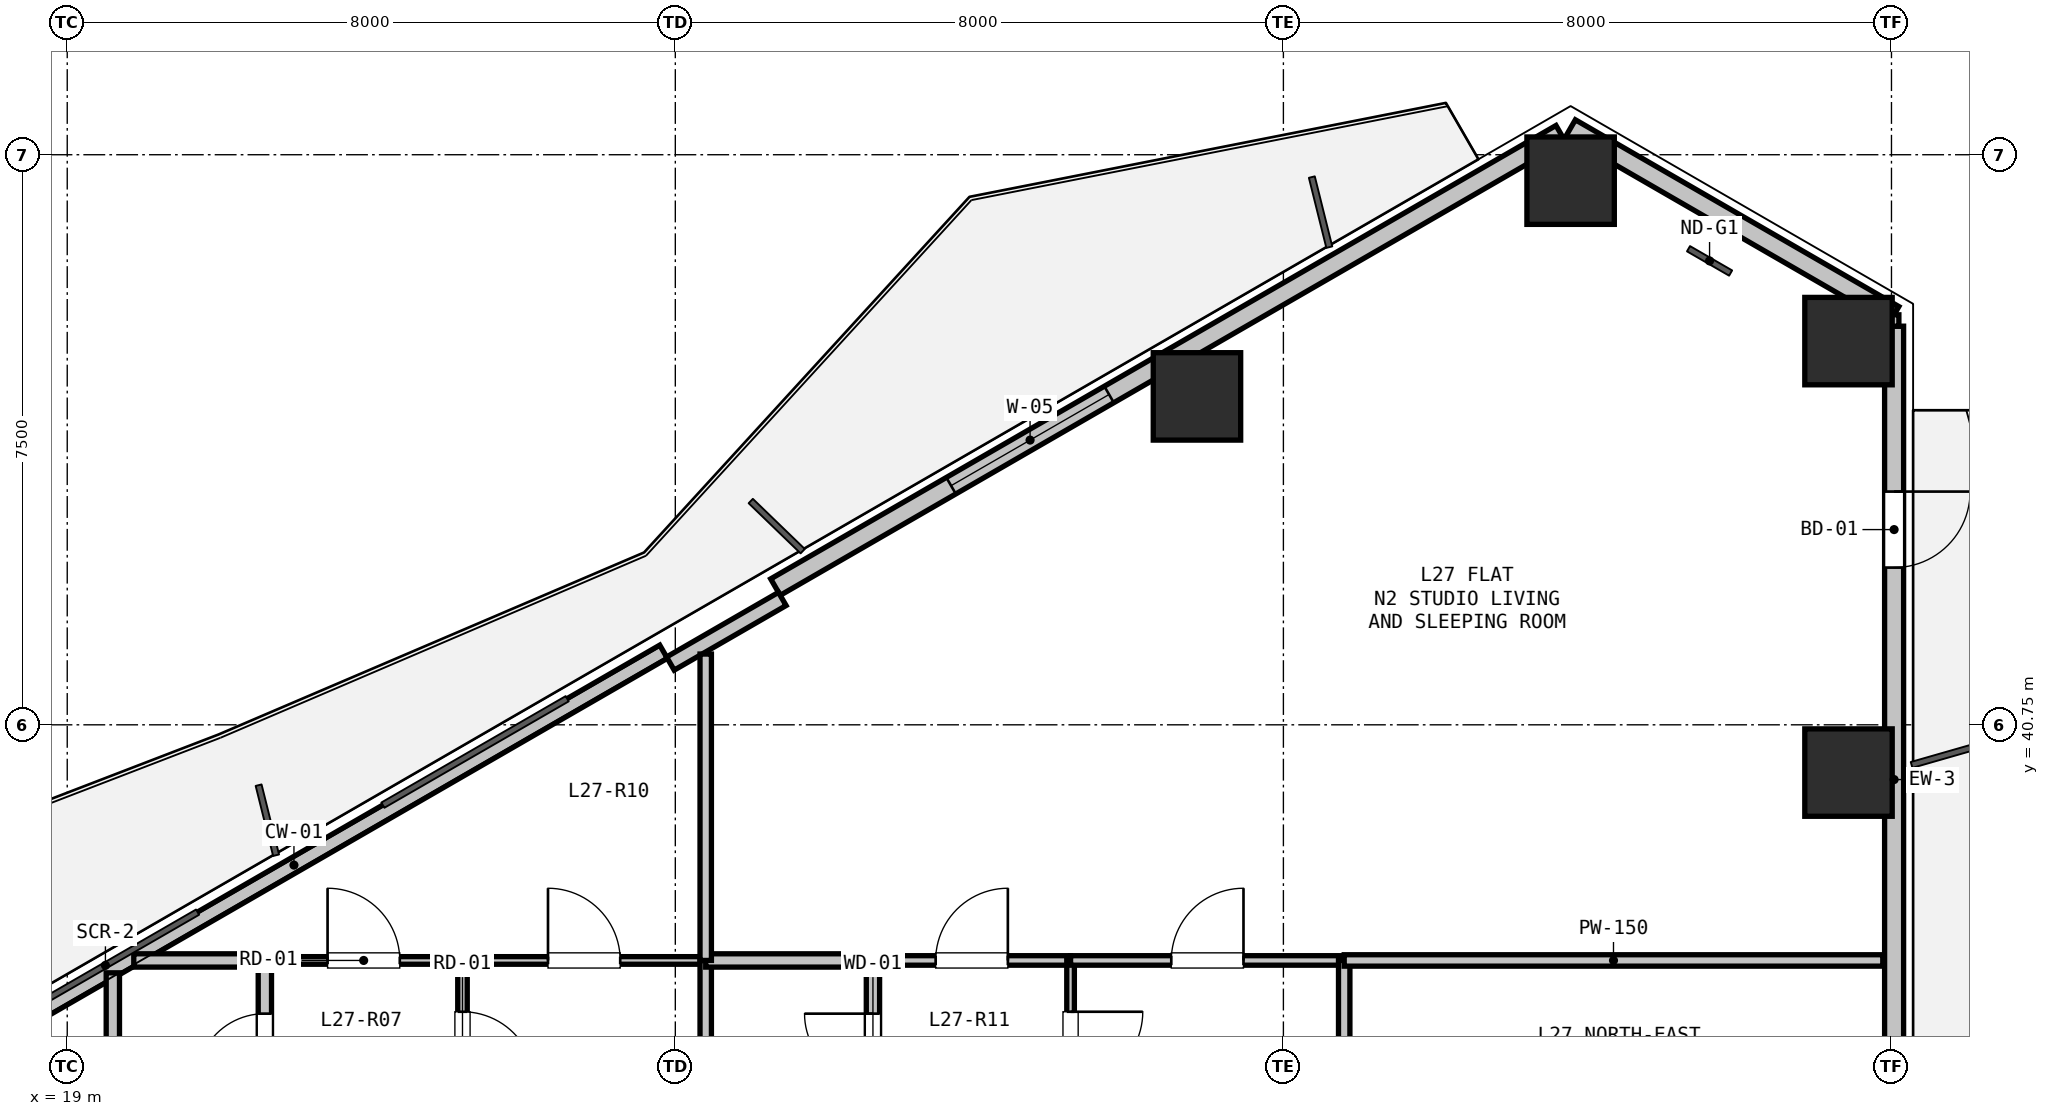
"""IFC4 building model, lengths in metres.
Left out: names, types, materials, properties, quantities, classifications, styles, units other than length and angle.
Written with IfcOpenShell. Run it as: python <this file> out.ifc"""

import sys

from ifc_helpers import new_model, si_unit, direction, frame, frame_2d, origin, origin_2d, place, context, subcontext, project, spatial, rectangle, hollow_rectangle, extrude, element, fill, save


model = new_model("IFC4")
c1 = context("Model", 3, precision=1e-05, world=origin(), true_north=direction((0.0, 1.0)))
c2 = subcontext(c1, "Body", "Model", "MODEL_VIEW")
j1 = project(units=[si_unit("LENGTHUNIT", "METRE"), si_unit("PLANEANGLEUNIT", "RADIAN")], contexts=[c1])
p1 = place(None, origin())
s1 = spatial("IfcSite", under=j1, at=p1, CompositionType="ELEMENT")
p2 = place(p1, origin())
s2 = spatial("IfcBuilding", under=s1, at=p2, CompositionType="ELEMENT")
p3 = place(p2, frame((0.0, 0.0, 99.9)))
s3 = spatial("IfcBuildingStorey", under=s2, at=p3, CompositionType="ELEMENT", Elevation=99.9)
for number, where, z_axis, x_axis in (
    (1, (33.863, 45.071, 0.0), (0.0, 0.0, 1.0), (1.0, 0.0, 0.0)),
    (2, (38.779, 47.909, 0.0), (0.0, 0.0, 1.0), (1.0, 0.0, 0.0)),
    (3, (42.435, 45.798, 0.0), (0.0, 0.0, 1.0), (1.0, 0.0, 0.0)),
    (4, (42.435, 40.122, 0.0), (0.0, 0.0, 1.0), (1.0, 0.0, 0.0)),
):
    element("IfcColumn", number, at=place(p3, frame(where, z_axis=z_axis, x_axis=x_axis)), inside=s3, PredefinedType="COLUMN", context=c2, shape_type="SweptSolid", body=[
        extrude(hollow_rectangle(XDim=1.15, YDim=1.15, WallThickness=0.032, at=origin_2d()), origin(), (0.0, 0.0, 1.0), 3.3),
    ])
p4 = place(p3, frame((38.779, 48.602, 0.0), z_axis=(0.0, 0.0, 1.0), x_axis=(0.866011848704, -0.500023477353, 0.0)))
e5 = element("IfcWall", 5, at=p4, inside=s3, PredefinedType="SOLIDWALL", context=c2, shape_type="SweptSolid", body=[
    extrude(rectangle(XDim=4.914, YDim=0.25, at=frame_2d((2.457, 0.0))), origin(), (0.0, 0.0, 1.0), 2.67),
])
p5 = place(p3, frame((17.12, 36.097, 0.0), z_axis=(0.0, 0.0, 1.0), x_axis=(0.866027010039, 0.499997217876, 0.0)))
e6 = element("IfcWall", 6, at=p5, inside=s3, PredefinedType="PARAPET", context=c2, shape_type="SweptSolid", body=[
    extrude(rectangle(XDim=11.229, YDim=0.2, at=frame_2d((5.615, 0.0))), origin(), (0.0, 0.0, 1.0), 0.2),
])
p6 = place(p3, frame((28.317, 42.562, 0.0), z_axis=(0.0, 0.0, 1.0), x_axis=(0.866023023012, 0.500004123596, 0.0)))
e7 = element("IfcWall", 7, at=p6, inside=s3, PredefinedType="SOLIDWALL", context=c2, shape_type="SweptSolid", body=[
    extrude(rectangle(XDim=11.93, YDim=0.25, at=frame_2d((5.965, 0.0))), origin(), (0.0, 0.0, 1.0), 2.67),
])
p7 = place(p6, frame((2.668, 0.0, 0.9)))
e8 = element("IfcOpeningElement", 8, at=p7, cuts=e7, PredefinedType="OPENING", context=c2, shape_type="SweptSolid", body=[
    extrude(rectangle(XDim=2.4, YDim=1.6, at=frame_2d((1.2, 0.8))), frame((0.0, 0.135, 0.0), z_axis=(0.0, -1.0, 0.0), x_axis=(1.0, 0.0, 0.0)), (0.0, 0.0, 1.0), 0.27),
])
p8 = place(p3, frame((26.935, 41.556, 0.0), z_axis=(0.0, 0.0, 1.0), x_axis=(0.86605165483, 0.499954529098, 0.0)))
e9 = element("IfcWall", 9, at=p8, inside=s3, PredefinedType="PARAPET", context=c2, shape_type="SweptSolid", body=[
    extrude(rectangle(XDim=1.7, YDim=0.2, at=frame_2d((0.85, 0.0))), origin(), (0.0, 0.0, 1.0), 2.67),
])
p9 = place(p3, frame((43.035, 45.994, 0.0), z_axis=(0.0, 0.0, 1.0), x_axis=(0.0, -1.0, 0.0)))
e10 = element("IfcWall", 10, at=p9, inside=s3, PredefinedType="SOLIDWALL", context=c2, shape_type="SweptSolid", body=[
    extrude(rectangle(XDim=11.93, YDim=0.25, at=frame_2d((5.965, 0.0))), origin(), (0.0, 0.0, 1.0), 2.67),
])
p10 = place(p9, frame((2.176, 0.0, 0.0)))
e11 = element("IfcOpeningElement", 11, at=p10, cuts=e10, PredefinedType="OPENING", context=c2, shape_type="SweptSolid", body=[
    extrude(rectangle(XDim=1.0, YDim=2.1, at=frame_2d((0.5, 1.05))), frame((0.0, 0.135, 0.0), z_axis=(0.0, -1.0, 0.0), x_axis=(1.0, 0.0, 0.0)), (0.0, 0.0, 1.0), 0.27),
])
p11 = place(p3, frame((21.6, 37.65, 0.0), z_axis=(0.0, 0.0, 1.0), x_axis=(1.0, 0.0, 0.0)))
e12 = element("IfcWall", 12, at=p11, inside=s3, PredefinedType="PARTITIONING", context=c2, shape_type="SweptSolid", body=[
    extrude(rectangle(XDim=2.6, YDim=0.1, at=frame_2d((1.3, 0.0))), origin(), (0.0, 0.0, 1.0), 3.05),
])
p12 = place(p11, frame((0.825, 0.0, 0.0)))
e13 = element("IfcOpeningElement", 13, at=p12, cuts=e12, PredefinedType="OPENING", context=c2, shape_type="SweptSolid", body=[
    extrude(rectangle(XDim=0.95, YDim=2.1, at=frame_2d((0.475, 1.05))), frame((0.0, 0.06, 0.0), z_axis=(0.0, -1.0, 0.0), x_axis=(1.0, 0.0, 0.0)), (0.0, 0.0, 1.0), 0.12),
])
p13 = place(p3, frame((24.2, 37.65, 0.0), z_axis=(0.0, 0.0, 1.0), x_axis=(0.0, -1.0, 0.0)))
e14 = element("IfcWall", 14, at=p13, inside=s3, PredefinedType="PARTITIONING", context=c2, shape_type="SweptSolid", body=[
    extrude(rectangle(XDim=2.3, YDim=0.125, at=frame_2d((1.15, 0.0))), origin(), (0.0, 0.0, 1.0), 3.05),
])
p14 = place(p13, frame((0.675, 0.0, 0.0)))
e15 = element("IfcOpeningElement", 15, at=p14, cuts=e14, PredefinedType="OPENING", context=c2, shape_type="SweptSolid", body=[
    extrude(rectangle(XDim=0.95, YDim=2.1, at=frame_2d((0.475, 1.05))), frame((0.0, 0.073, 0.0), z_axis=(0.0, -1.0, 0.0), x_axis=(1.0, 0.0, 0.0)), (0.0, 0.0, 1.0), 0.145),
])
p15 = place(p3, frame((21.6, 35.35, 0.0), z_axis=(0.0, 0.0, 1.0), x_axis=(0.0, 1.0, 0.0)))
e16 = element("IfcWall", 16, at=p15, inside=s3, PredefinedType="PLUMBINGWALL", context=c2, shape_type="SweptSolid", body=[
    extrude(rectangle(XDim=2.3, YDim=0.175, at=frame_2d((1.15, 0.0))), origin(), (0.0, 0.0, 1.0), 3.05),
])
p16 = place(p15, frame((0.7, 0.0, 0.0)))
e17 = element("IfcOpeningElement", 17, at=p16, cuts=e16, PredefinedType="OPENING", context=c2, shape_type="SweptSolid", body=[
    extrude(rectangle(XDim=0.9, YDim=2.1, at=frame_2d((0.45, 1.05))), frame((0.0, 0.097, 0.0), z_axis=(0.0, -1.0, 0.0), x_axis=(1.0, 0.0, 0.0)), (0.0, 0.0, 1.0), 0.195),
])
p17 = place(p3, frame((29.6, 37.65, 0.0), z_axis=(0.0, 0.0, 1.0), x_axis=(1.0, 0.0, 0.0)))
e18 = element("IfcWall", 18, at=p17, inside=s3, PredefinedType="PARTITIONING", context=c2, shape_type="SweptSolid", body=[
    extrude(rectangle(XDim=2.6, YDim=0.125, at=frame_2d((1.3, 0.0))), origin(), (0.0, 0.0, 1.0), 3.05),
])
p18 = place(p17, frame((0.825, 0.0, 0.0)))
e19 = element("IfcOpeningElement", 19, at=p18, cuts=e18, PredefinedType="OPENING", context=c2, shape_type="SweptSolid", body=[
    extrude(rectangle(XDim=0.95, YDim=2.1, at=frame_2d((0.475, 1.05))), frame((0.0, 0.073, 0.0), z_axis=(0.0, -1.0, 0.0), x_axis=(1.0, 0.0, 0.0)), (0.0, 0.0, 1.0), 0.145),
])
p19 = place(p3, frame((32.2, 37.65, 0.0), z_axis=(0.0, 0.0, 1.0), x_axis=(0.0, -1.0, 0.0)))
e20 = element("IfcWall", 20, at=p19, inside=s3, PredefinedType="PARTITIONING", context=c2, shape_type="SweptSolid", body=[
    extrude(rectangle(XDim=2.3, YDim=0.1, at=frame_2d((1.15, 0.0))), origin(), (0.0, 0.0, 1.0), 3.05),
])
p20 = place(p19, frame((0.675, 0.0, 0.0)))
e21 = element("IfcOpeningElement", 21, at=p20, cuts=e20, PredefinedType="OPENING", context=c2, shape_type="SweptSolid", body=[
    extrude(rectangle(XDim=0.95, YDim=2.1, at=frame_2d((0.475, 1.05))), frame((0.0, 0.06, 0.0), z_axis=(0.0, -1.0, 0.0), x_axis=(1.0, 0.0, 0.0)), (0.0, 0.0, 1.0), 0.12),
])
p21 = place(p3, frame((29.6, 35.35, 0.0), z_axis=(0.0, 0.0, 1.0), x_axis=(0.0, 1.0, 0.0)))
e22 = element("IfcWall", 22, at=p21, inside=s3, PredefinedType="PLUMBINGWALL", context=c2, shape_type="SweptSolid", body=[
    extrude(rectangle(XDim=2.3, YDim=0.175, at=frame_2d((1.15, 0.0))), origin(), (0.0, 0.0, 1.0), 3.05),
])
p22 = place(p21, frame((0.7, 0.0, 0.0)))
e23 = element("IfcOpeningElement", 23, at=p22, cuts=e22, PredefinedType="OPENING", context=c2, shape_type="SweptSolid", body=[
    extrude(rectangle(XDim=0.9, YDim=2.1, at=frame_2d((0.45, 1.05))), frame((0.0, 0.097, 0.0), z_axis=(0.0, -1.0, 0.0), x_axis=(1.0, 0.0, 0.0)), (0.0, 0.0, 1.0), 0.195),
])
p23 = place(p3, frame((19.6, 35.35, 0.0), z_axis=(0.0, 0.0, 1.0), x_axis=(0.0, 1.0, 0.0)))
e24 = element("IfcWall", 24, at=p23, inside=s3, PredefinedType="PLUMBINGWALL", context=c2, shape_type="SweptSolid", body=[
    extrude(rectangle(XDim=2.137, YDim=0.175, at=frame_2d((1.068, 0.0))), origin(), (0.0, 0.0, 1.0), 2.365),
])
p24 = place(p3, frame((19.875, 37.65, 0.0), z_axis=(0.0, 0.0, 1.0), x_axis=(1.0, 0.0, 0.0)))
e25 = element("IfcWall", 25, at=p24, inside=s3, PredefinedType="PLUMBINGWALL", context=c2, shape_type="SweptSolid", body=[
    extrude(rectangle(XDim=1.725, YDim=0.175, at=frame_2d((0.862, 0.0))), origin(), (0.0, 0.0, 1.0), 2.365),
])
p25 = place(p3, frame((24.2, 37.65, 0.0), z_axis=(0.0, 0.0, 1.0), x_axis=(1.0, 0.0, 0.0)))
e26 = element("IfcWall", 26, at=p25, inside=s3, PredefinedType="PARTITIONING", context=c2, shape_type="SweptSolid", body=[
    extrude(rectangle(XDim=3.2, YDim=0.1, at=frame_2d((1.6, 0.0))), origin(), (0.0, 0.0, 1.0), 3.05),
])
p26 = place(p25, frame((1.125, 0.0, 0.0)))
e27 = element("IfcOpeningElement", 27, at=p26, cuts=e26, PredefinedType="OPENING", context=c2, shape_type="SweptSolid", body=[
    extrude(rectangle(XDim=0.95, YDim=2.1, at=frame_2d((0.475, 1.05))), frame((0.0, 0.06, 0.0), z_axis=(0.0, -1.0, 0.0), x_axis=(1.0, 0.0, 0.0)), (0.0, 0.0, 1.0), 0.12),
])
p27 = place(p3, frame((27.4, 37.65, 0.0), z_axis=(0.0, 0.0, 1.0), x_axis=(0.0, -1.0, 0.0)))
e28 = element("IfcWall", 28, at=p27, inside=s3, PredefinedType="PARTITIONING", context=c2, shape_type="SweptSolid", body=[
    extrude(rectangle(XDim=2.3, YDim=0.15, at=frame_2d((1.15, 0.0))), origin(), (0.0, 0.0, 1.0), 3.05),
])
p28 = place(p3, frame((27.4, 37.65, 0.0), z_axis=(0.0, 0.0, 1.0), x_axis=(1.0, 0.0, 0.0)))
e29 = element("IfcWall", 29, at=p28, inside=s3, PredefinedType="PLUMBINGWALL", context=c2, shape_type="SweptSolid", body=[
    extrude(rectangle(XDim=2.2, YDim=0.175, at=frame_2d((1.1, 0.0))), origin(), (0.0, 0.0, 1.0), 3.05),
])
p29 = place(p3, frame((32.2, 37.65, 0.0), z_axis=(0.0, 0.0, 1.0), x_axis=(1.0, 0.0, 0.0)))
e30 = element("IfcWall", 30, at=p29, inside=s3, PredefinedType="PARTITIONING", context=c2, shape_type="SweptSolid", body=[
    extrude(rectangle(XDim=3.6, YDim=0.125, at=frame_2d((1.8, 0.0))), origin(), (0.0, 0.0, 1.0), 3.05),
])
p30 = place(p29, frame((1.325, 0.0, 0.0)))
e31 = element("IfcOpeningElement", 31, at=p30, cuts=e30, PredefinedType="OPENING", context=c2, shape_type="SweptSolid", body=[
    extrude(rectangle(XDim=0.95, YDim=2.1, at=frame_2d((0.475, 1.05))), frame((0.0, 0.073, 0.0), z_axis=(0.0, -1.0, 0.0), x_axis=(1.0, 0.0, 0.0)), (0.0, 0.0, 1.0), 0.145),
])
p31 = place(p3, frame((35.8, 37.65, 0.0), z_axis=(0.0, 0.0, 1.0), x_axis=(0.0, -1.0, 0.0)))
e32 = element("IfcWall", 32, at=p31, inside=s3, PredefinedType="PARTITIONING", context=c2, shape_type="SweptSolid", body=[
    extrude(rectangle(XDim=2.3, YDim=0.15, at=frame_2d((1.15, 0.0))), origin(), (0.0, 0.0, 1.0), 3.05),
])
p32 = place(p3, frame((35.8, 37.65, 0.0), z_axis=(0.0, 0.0, 1.0), x_axis=(1.0, 0.0, 0.0)))
e33 = element("IfcWall", 33, at=p32, inside=s3, PredefinedType="PARTITIONING", context=c2, shape_type="SweptSolid", body=[
    extrude(rectangle(XDim=7.085, YDim=0.15, at=frame_2d((3.543, 0.0))), origin(), (0.0, 0.0, 1.0), 2.365),
])
p33 = place(p3, frame((27.4, 41.681, 0.0), z_axis=(0.0, 0.0, 1.0), x_axis=(0.0, -1.0, 0.0)))
e34 = element("IfcWall", 34, at=p33, inside=s3, PredefinedType="PARTITIONING", context=c2, shape_type="SweptSolid", body=[
    extrude(rectangle(XDim=4.031, YDim=0.15, at=frame_2d((2.016, 0.0))), origin(), (0.0, 0.0, 1.0), 2.365),
])
p34 = place(p3, frame((43.035, 46.144, 0.0), z_axis=(0.0, 0.0, 1.0), x_axis=(0.0, -1.0, 0.0)))
e35 = element("IfcWall", 35, at=p34, inside=s3, PredefinedType="PARTITIONING", context=c2, shape_type="SweptSolid", body=[
    extrude(rectangle(XDim=0.15, YDim=0.125, at=frame_2d((0.075, 0.0))), origin(), (0.0, 0.0, 1.0), 3.05),
])
p35 = place(p7, origin())
e36 = element("IfcWindow", 36, at=p35, inside=s3, PartitioningType="SINGLE_PANEL", PredefinedType="WINDOW", context=c2, shape_type="SweptSolid", body=[
    extrude(rectangle(XDim=2.4, YDim=1.6, at=frame_2d((1.2, 0.8))), frame((0.0, 0.03, 0.0), z_axis=(0.0, -1.0, 0.0), x_axis=(1.0, 0.0, 0.0)), (0.0, 0.0, 1.0), 0.06),
])
fill(e8, e36)
p36 = place(p10, origin())
e37 = element("IfcDoor", 37, at=p36, inside=s3, OperationType="SINGLE_SWING_LEFT", PredefinedType="DOOR", context=c2, shape_type="SweptSolid", body=[
    extrude(rectangle(XDim=1.0, YDim=2.1, at=frame_2d((0.5, 1.05))), frame((0.0, 0.025, 0.0), z_axis=(0.0, -1.0, 0.0), x_axis=(1.0, 0.0, 0.0)), (0.0, 0.0, 1.0), 0.05),
])
fill(e11, e37)
p37 = place(p16, origin())
e38 = element("IfcDoor", 38, at=p37, inside=s3, OperationType="SINGLE_SWING_LEFT", PredefinedType="DOOR", context=c2, shape_type="SweptSolid", body=[
    extrude(rectangle(XDim=0.9, YDim=2.1, at=frame_2d((0.45, 1.05))), frame((0.0, 0.025, 0.0), z_axis=(0.0, -1.0, 0.0), x_axis=(1.0, 0.0, 0.0)), (0.0, 0.0, 1.0), 0.05),
])
fill(e17, e38)
p38 = place(p14, origin())
e39 = element("IfcDoor", 39, at=p38, inside=s3, OperationType="SINGLE_SWING_RIGHT", PredefinedType="DOOR", context=c2, shape_type="SweptSolid", body=[
    extrude(rectangle(XDim=0.95, YDim=2.1, at=frame_2d((0.475, 1.05))), frame((0.0, 0.025, 0.0), z_axis=(0.0, -1.0, 0.0), x_axis=(1.0, 0.0, 0.0)), (0.0, 0.0, 1.0), 0.05),
])
fill(e15, e39)
p39 = place(p12, origin())
e40 = element("IfcDoor", 40, at=p39, inside=s3, OperationType="SINGLE_SWING_LEFT", PredefinedType="DOOR", context=c2, shape_type="SweptSolid", body=[
    extrude(rectangle(XDim=0.95, YDim=2.1, at=frame_2d((0.475, 1.05))), frame((0.0, 0.025, 0.0), z_axis=(0.0, -1.0, 0.0), x_axis=(1.0, 0.0, 0.0)), (0.0, 0.0, 1.0), 0.05),
])
fill(e13, e40)
p40 = place(p22, origin())
e41 = element("IfcDoor", 41, at=p40, inside=s3, OperationType="SINGLE_SWING_RIGHT", PredefinedType="DOOR", context=c2, shape_type="SweptSolid", body=[
    extrude(rectangle(XDim=0.9, YDim=2.1, at=frame_2d((0.45, 1.05))), frame((0.0, 0.025, 0.0), z_axis=(0.0, -1.0, 0.0), x_axis=(1.0, 0.0, 0.0)), (0.0, 0.0, 1.0), 0.05),
])
fill(e23, e41)
p41 = place(p20, origin())
e42 = element("IfcDoor", 42, at=p41, inside=s3, OperationType="SINGLE_SWING_LEFT", PredefinedType="DOOR", context=c2, shape_type="SweptSolid", body=[
    extrude(rectangle(XDim=0.95, YDim=2.1, at=frame_2d((0.475, 1.05))), frame((0.0, 0.025, 0.0), z_axis=(0.0, -1.0, 0.0), x_axis=(1.0, 0.0, 0.0)), (0.0, 0.0, 1.0), 0.05),
])
fill(e21, e42)
p42 = place(p18, origin())
e43 = element("IfcDoor", 43, at=p42, inside=s3, OperationType="SINGLE_SWING_RIGHT", PredefinedType="DOOR", context=c2, shape_type="SweptSolid", body=[
    extrude(rectangle(XDim=0.95, YDim=2.1, at=frame_2d((0.475, 1.05))), frame((0.0, 0.025, 0.0), z_axis=(0.0, -1.0, 0.0), x_axis=(1.0, 0.0, 0.0)), (0.0, 0.0, 1.0), 0.05),
])
fill(e19, e43)
p43 = place(p26, origin())
e44 = element("IfcDoor", 44, at=p43, inside=s3, OperationType="SINGLE_SWING_LEFT", PredefinedType="DOOR", context=c2, shape_type="SweptSolid", body=[
    extrude(rectangle(XDim=0.95, YDim=2.1, at=frame_2d((0.475, 1.05))), frame((0.0, 0.025, 0.0), z_axis=(0.0, -1.0, 0.0), x_axis=(1.0, 0.0, 0.0)), (0.0, 0.0, 1.0), 0.05),
])
fill(e27, e44)
p44 = place(p30, origin())
e45 = element("IfcDoor", 45, at=p44, inside=s3, OperationType="SINGLE_SWING_RIGHT", PredefinedType="DOOR", context=c2, shape_type="SweptSolid", body=[
    extrude(rectangle(XDim=0.95, YDim=2.1, at=frame_2d((0.475, 1.05))), frame((0.0, 0.025, 0.0), z_axis=(0.0, -1.0, 0.0), x_axis=(1.0, 0.0, 0.0)), (0.0, 0.0, 1.0), 0.05),
])
fill(e31, e45)
save(model, sys.argv[1])
